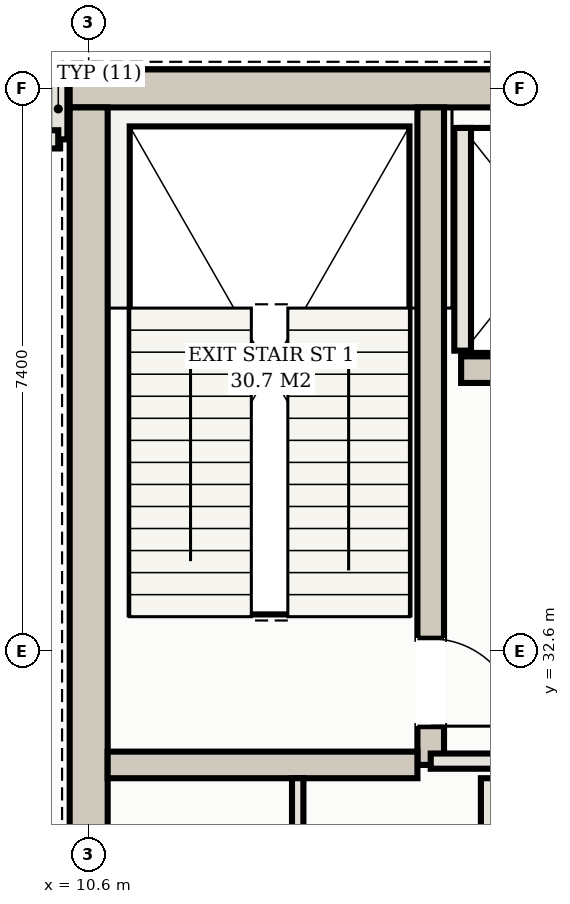
"""IFC4 building model, lengths in metres.
Left out: names, types, materials, properties, quantities, classifications, styles, units other than length and angle.
Written with IfcOpenShell. Run it as: python <this file> out.ifc"""

import sys

from ifc_helpers import new_model, si_unit, direction, frame, frame_2d, origin, place, context, subcontext, project, spatial, rectangle, extrude, element, fill, save


model = new_model("IFC4")
c1 = context("Model", 3, precision=1e-05, world=origin(), true_north=direction((0.0, 1.0)))
c2 = subcontext(c1, "Body", "Model", "MODEL_VIEW")
j1 = project(units=[si_unit("LENGTHUNIT", "METRE"), si_unit("PLANEANGLEUNIT", "RADIAN")], contexts=[c1])
p1 = place(None, origin())
s1 = spatial("IfcSite", under=j1, at=p1, CompositionType="ELEMENT")
p2 = place(p1, origin())
s2 = spatial("IfcBuilding", under=s1, at=p2, CompositionType="ELEMENT")
p3 = place(p2, frame((0.0, 0.0, 266.0)))
s3 = spatial("IfcBuildingStorey", under=s2, at=p3, CompositionType="ELEMENT", Elevation=266.0)
p4 = place(p3, frame((10.35, 40.0, 0.0), z_axis=(0.0, 0.0, 1.0), x_axis=(1.0, 0.0, 0.0)))
e1 = element("IfcWall", 1, at=p4, inside=s3, PredefinedType="SHEAR", context=c2, shape_type="SweptSolid", body=[
    extrude(rectangle(XDim=32.3, YDim=0.5, at=frame_2d((16.15, 0.0))), origin(), (0.0, 0.0, 1.0), 4.52),
])
p5 = place(p3, frame((10.6, 25.45, 0.0), z_axis=(0.0, 0.0, 1.0), x_axis=(0.0, 1.0, 0.0)))
e2 = element("IfcWall", 2, at=p5, inside=s3, PredefinedType="SHEAR", context=c2, shape_type="SweptSolid", body=[
    extrude(rectangle(XDim=14.3, YDim=0.5, at=frame_2d((7.15, 0.0))), origin(), (0.0, 0.0, 1.0), 4.52),
])
p6 = place(p3, frame((15.1, 31.1, 0.0), z_axis=(0.0, 0.0, 1.0), x_axis=(0.0, 1.0, 0.0)))
e3 = element("IfcWall", 3, at=p6, inside=s3, PredefinedType="SHEAR", context=c2, shape_type="SweptSolid", body=[
    extrude(rectangle(XDim=8.65, YDim=0.35, at=frame_2d((4.325, 0.0))), origin(), (0.0, 0.0, 1.0), 4.52),
])
p7 = place(p6, frame((0.51, 0.0, 0.0)))
e4 = element("IfcOpeningElement", 4, at=p7, cuts=e3, PredefinedType="OPENING", context=c2, shape_type="SweptSolid", body=[
    extrude(rectangle(XDim=1.15, YDim=2.2, at=frame_2d((0.575, 1.1))), frame((0.0, 0.185, 0.0), z_axis=(0.0, -1.0, 0.0), x_axis=(1.0, 0.0, 0.0)), (0.0, 0.0, 1.0), 0.37),
])
p8 = place(p3, frame((10.85, 31.1, 0.0), z_axis=(0.0, 0.0, 1.0), x_axis=(1.0, 0.0, 0.0)))
e5 = element("IfcWall", 5, at=p8, inside=s3, PredefinedType="SHEAR", context=c2, shape_type="SweptSolid", body=[
    extrude(rectangle(XDim=4.075, YDim=0.35, at=frame_2d((2.038, 0.0))), origin(), (0.0, 0.0, 1.0), 4.52),
])
p9 = place(p3, frame((15.5, 36.3, 0.0), z_axis=(0.0, 0.0, 1.0), x_axis=(1.0, 0.0, 0.0)))
e6 = element("IfcWall", 6, at=p9, inside=s3, PredefinedType="SHEAR", context=c2, shape_type="SweptSolid", body=[
    extrude(rectangle(XDim=22.0, YDim=0.35, at=frame_2d((11.0, 0.0))), origin(), (0.0, 0.0, 1.0), 4.52),
])
p10 = place(p9, frame((0.65, 0.0, 0.0)))
e7 = element("IfcOpeningElement", 7, at=p10, cuts=e6, PredefinedType="OPENING", context=c2, shape_type="SweptSolid", body=[
    extrude(rectangle(XDim=1.1, YDim=2.15, at=frame_2d((0.55, 1.075))), frame((0.0, 0.185, 0.0), z_axis=(0.0, -1.0, 0.0), x_axis=(1.0, 0.0, 0.0)), (0.0, 0.0, 1.0), 0.37),
])
p11 = place(p9, frame((20.25, 0.0, 0.0)))
e8 = element("IfcOpeningElement", 8, at=p11, cuts=e6, PredefinedType="OPENING", context=c2, shape_type="SweptSolid", body=[
    extrude(rectangle(XDim=1.1, YDim=2.15, at=frame_2d((0.55, 1.075))), frame((0.0, 0.185, 0.0), z_axis=(0.0, -1.0, 0.0), x_axis=(1.0, 0.0, 0.0)), (0.0, 0.0, 1.0), 0.37),
])
p12 = place(p9, frame((17.05, 0.0, 0.0)))
e9 = element("IfcOpeningElement", 9, at=p12, cuts=e6, PredefinedType="OPENING", context=c2, shape_type="SweptSolid", body=[
    extrude(rectangle(XDim=1.3, YDim=2.2, at=frame_2d((0.65, 1.1))), frame((0.0, 0.185, 0.0), z_axis=(0.0, -1.0, 0.0), x_axis=(1.0, 0.0, 0.0)), (0.0, 0.0, 1.0), 0.37),
])
p13 = place(p9, frame((3.95, 0.0, 0.0)))
e10 = element("IfcOpeningElement", 10, at=p13, cuts=e6, PredefinedType="OPENING", context=c2, shape_type="SweptSolid", body=[
    extrude(rectangle(XDim=1.1, YDim=2.15, at=frame_2d((0.55, 1.075))), frame((0.0, 0.185, 0.0), z_axis=(0.0, -1.0, 0.0), x_axis=(1.0, 0.0, 0.0)), (0.0, 0.0, 1.0), 0.37),
])
p14 = place(p9, frame((6.55, 0.0, 0.0)))
e11 = element("IfcOpeningElement", 11, at=p14, cuts=e6, PredefinedType="OPENING", context=c2, shape_type="SweptSolid", body=[
    extrude(rectangle(XDim=1.1, YDim=2.15, at=frame_2d((0.55, 1.075))), frame((0.0, 0.185, 0.0), z_axis=(0.0, -1.0, 0.0), x_axis=(1.0, 0.0, 0.0)), (0.0, 0.0, 1.0), 0.37),
])
p15 = place(p9, frame((9.15, 0.0, 0.0)))
e12 = element("IfcOpeningElement", 12, at=p15, cuts=e6, PredefinedType="OPENING", context=c2, shape_type="SweptSolid", body=[
    extrude(rectangle(XDim=1.1, YDim=2.15, at=frame_2d((0.55, 1.075))), frame((0.0, 0.185, 0.0), z_axis=(0.0, -1.0, 0.0), x_axis=(1.0, 0.0, 0.0)), (0.0, 0.0, 1.0), 0.37),
])
p16 = place(p3, frame((15.52, 36.55, 0.0), z_axis=(0.0, 0.0, 1.0), x_axis=(0.0, 1.0, 0.0)))
e13 = element("IfcWall", 13, at=p16, inside=s3, PredefinedType="SOLIDWALL", context=c2, shape_type="SweptSolid", body=[
    extrude(rectangle(XDim=2.93, YDim=0.22, at=frame_2d((1.465, 0.0))), origin(), (0.0, 0.0, 1.0), 4.52),
])
p17 = place(p3, frame((10.35, 40.13, 0.0), z_axis=(0.0, 0.0, 1.0), x_axis=(-1.0, 0.0, 0.0)))
e14 = element("IfcWall", 14, at=p17, inside=s3, PredefinedType="SOLIDWALL", context=c2, shape_type="SweptSolid", body=[
    extrude(rectangle(XDim=0.02, YDim=0.24, at=frame_2d((0.01, 0.0))), origin(), (0.0, 0.0, 1.0), 4.52),
])
p18 = place(p3, frame((10.2, 40.13, 0.0), z_axis=(0.0, 0.0, 1.0), x_axis=(0.0, -1.0, 0.0)))
e15 = element("IfcWall", 15, at=p18, inside=s3, PredefinedType="SOLIDWALL", context=c2, shape_type="SweptSolid", body=[
    extrude(rectangle(XDim=0.8, YDim=0.24, at=frame_2d((0.4, 0.0))), origin(), (0.0, 0.0, 1.0), 4.52),
])
p19 = place(p3, frame((10.2, 39.33, 0.0), z_axis=(0.0, 0.0, 1.0), x_axis=(-1.0, 0.0, 0.0)))
e16 = element("IfcWall", 16, at=p19, inside=s3, PredefinedType="SOLIDWALL", context=c2, shape_type="SweptSolid", body=[
    extrude(rectangle(XDim=0.8, YDim=0.24, at=frame_2d((0.4, 0.0))), origin(), (0.0, 0.0, 1.0), 4.52),
])
p20 = place(p3, frame((15.1, 31.15, 0.0), z_axis=(0.0, 0.0, 1.0), x_axis=(1.0, 0.0, 0.0)))
e17 = element("IfcWall", 17, at=p20, inside=s3, PredefinedType="PARTITIONING", context=c2, shape_type="SweptSolid", body=[
    extrude(rectangle(XDim=3.25, YDim=0.2, at=frame_2d((1.625, 0.0))), origin(), (0.0, 0.0, 1.0), 4.52),
])
p21 = place(p20, frame((1.275, 0.0, 0.0)))
e18 = element("IfcOpeningElement", 18, at=p21, cuts=e17, PredefinedType="OPENING", context=c2, shape_type="SweptSolid", body=[
    extrude(rectangle(XDim=1.25, YDim=2.2, at=frame_2d((0.625, 1.1))), frame((0.0, 0.11, 0.0), z_axis=(0.0, -1.0, 0.0), x_axis=(1.0, 0.0, 0.0)), (0.0, 0.0, 1.0), 0.22),
])
p22 = place(p3, frame((15.85, 25.45, 0.0), z_axis=(0.0, 0.0, 1.0), x_axis=(0.0, 1.0, 0.0)))
e19 = element("IfcWall", 19, at=p22, inside=s3, PredefinedType="PARTITIONING", context=c2, shape_type="SweptSolid", body=[
    extrude(rectangle(XDim=5.475, YDim=0.18, at=frame_2d((2.738, 0.0))), origin(), (0.0, 0.0, 1.0), 3.865),
])
p23 = place(p22, frame((0.75, 0.0, 0.0)))
e20 = element("IfcOpeningElement", 20, at=p23, cuts=e19, PredefinedType="OPENING", context=c2, shape_type="SweptSolid", body=[
    extrude(rectangle(XDim=0.9, YDim=2.15, at=frame_2d((0.45, 1.075))), frame((0.0, 0.1, 0.0), z_axis=(0.0, -1.0, 0.0), x_axis=(1.0, 0.0, 0.0)), (0.0, 0.0, 1.0), 0.2),
])
p24 = place(p22, frame((3.427, 0.0, 0.0)))
e21 = element("IfcOpeningElement", 21, at=p24, cuts=e19, PredefinedType="OPENING", context=c2, shape_type="SweptSolid", body=[
    extrude(rectangle(XDim=0.92, YDim=2.15, at=frame_2d((0.46, 1.075))), frame((0.0, 0.1, 0.0), z_axis=(0.0, -1.0, 0.0), x_axis=(1.0, 0.0, 0.0)), (0.0, 0.0, 1.0), 0.2),
])
p25 = place(p3, frame((13.35, 27.8, 0.0), z_axis=(0.0, 0.0, 1.0), x_axis=(0.0, 1.0, 0.0)))
e22 = element("IfcWall", 22, at=p25, inside=s3, PredefinedType="PARTITIONING", context=c2, shape_type="SweptSolid", body=[
    extrude(rectangle(XDim=3.125, YDim=0.15, at=frame_2d((1.562, 0.0))), origin(), (0.0, 0.0, 1.0), 4.52),
])
p26 = place(p25, frame((1.103, 0.0, 0.0)))
e23 = element("IfcOpeningElement", 23, at=p26, cuts=e22, PredefinedType="OPENING", context=c2, shape_type="SweptSolid", body=[
    extrude(rectangle(XDim=0.92, YDim=2.15, at=frame_2d((0.46, 1.075))), frame((0.0, 0.085, 0.0), z_axis=(0.0, -1.0, 0.0), x_axis=(1.0, 0.0, 0.0)), (0.0, 0.0, 1.0), 0.17),
])
p27 = place(p7, frame((1.15, 0.0, 0.0), z_axis=(0.0, 0.0, 1.0), x_axis=(-1.0, 0.0, 0.0)))
e24 = element("IfcDoor", 24, at=p27, inside=s3, OperationType="SINGLE_SWING_RIGHT", PredefinedType="DOOR", context=c2, shape_type="SweptSolid", body=[
    extrude(rectangle(XDim=1.15, YDim=2.2, at=frame_2d((0.575, 1.1))), frame((0.0, 0.025, 0.0), z_axis=(0.0, -1.0, 0.0), x_axis=(1.0, 0.0, 0.0)), (0.0, 0.0, 1.0), 0.05),
])
fill(e4, e24)
save(model, sys.argv[1])
